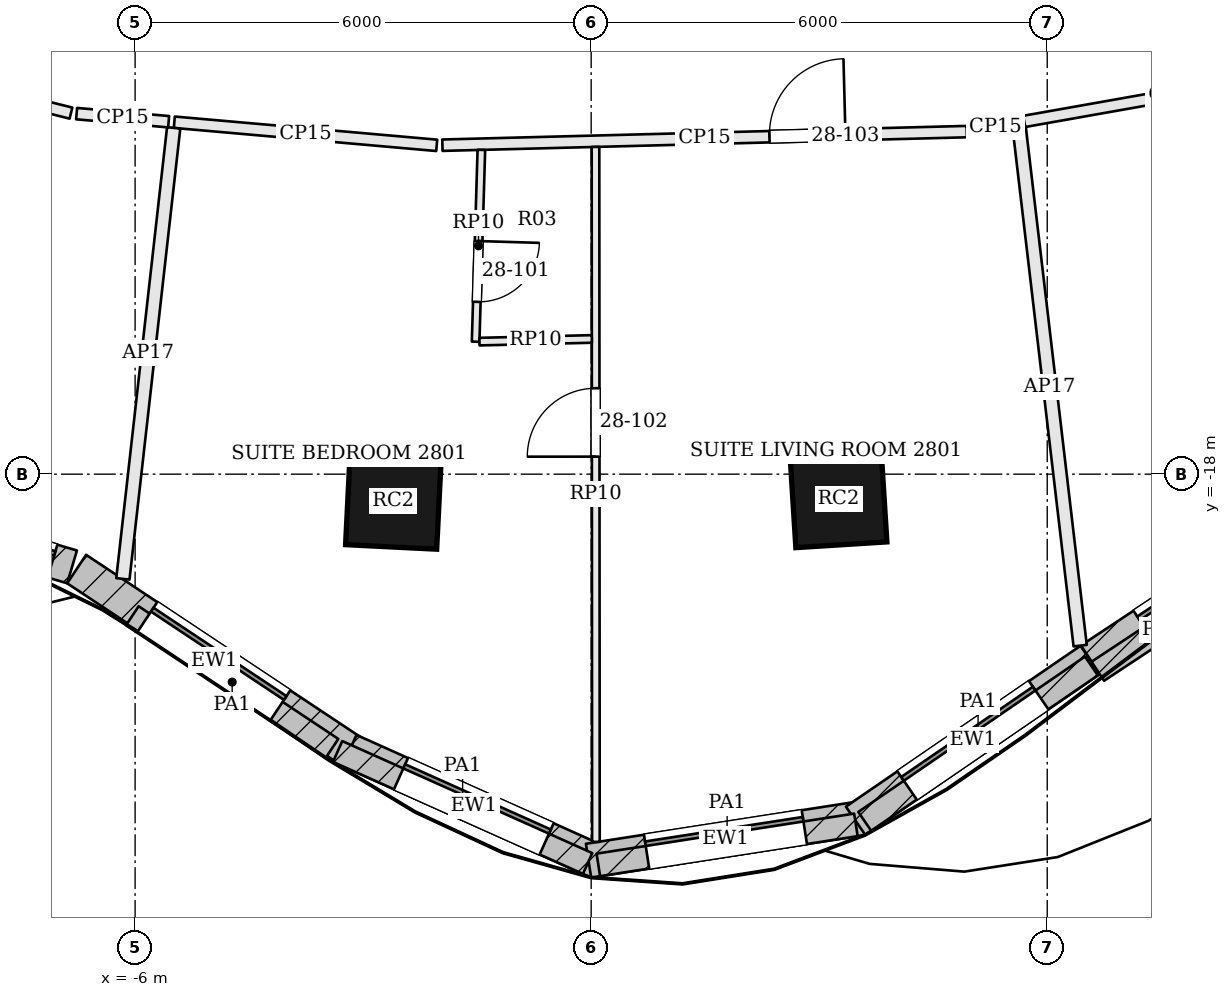
"""IFC4 building model, lengths in metres.
Left out: names, types, materials, properties, quantities, classifications, styles, units other than length and angle.
Written with IfcOpenShell. Run it as: python <this file> out.ifc"""

import sys

from ifc_helpers import new_model, si_unit, direction, frame, frame_2d, origin, origin_2d, place, context, subcontext, project, spatial, rectangle, extrude, element, fill, save


model = new_model("IFC4")
c1 = context("Model", 3, precision=1e-05, world=origin(), true_north=direction((0.0, 1.0)))
c2 = subcontext(c1, "Body", "Model", "MODEL_VIEW")
j1 = project(units=[si_unit("LENGTHUNIT", "METRE"), si_unit("PLANEANGLEUNIT", "RADIAN")], contexts=[c1])
p1 = place(None, origin())
s1 = spatial("IfcSite", under=j1, at=p1, CompositionType="ELEMENT")
p2 = place(p1, origin())
s2 = spatial("IfcBuilding", under=s1, at=p2, CompositionType="ELEMENT")
p3 = place(p2, frame((0.0, 0.0, 117.6)))
s3 = spatial("IfcBuildingStorey", under=s2, at=p3, CompositionType="ELEMENT", Elevation=117.6)
for number, where, z_axis, x_axis in (
    (1, (-2.602, -18.358, 0.0), (0.0, 0.0, 1.0), (0.999, -0.05, 0.0)),
    (2, (3.254, -18.33, 0.0), (0.0, 0.0, 1.0), (0.998, 0.063, 0.0)),
):
    element("IfcColumn", number, at=place(p3, frame(where, z_axis=z_axis, x_axis=x_axis)), inside=s3, PredefinedType="COLUMN", context=c2, shape_type="SweptSolid", body=[
        extrude(rectangle(XDim=1.2, YDim=1.2, at=origin_2d()), origin(), (0.0, 0.0, 1.0), 2.8),
    ])
p4 = place(p3, frame((-9.357, -18.469, 0.0), z_axis=(0.0, 0.0, 1.0), x_axis=(0.958524054629, -0.285011643091, 0.0)))
e3 = element("IfcWall", 3, at=p4, inside=s3, PredefinedType="SOLIDWALL", context=c2, shape_type="SweptSolid", body=[
    extrude(rectangle(XDim=2.637, YDim=0.45, at=frame_2d((1.319, 0.0))), origin(), (0.0, 0.0, 1.0), 3.3),
])
p5 = place(p4, frame((0.269, 0.0, 0.9)))
e4 = element("IfcOpeningElement", 4, at=p5, cuts=e3, PredefinedType="OPENING", context=c2, shape_type="SweptSolid", body=[
    extrude(rectangle(XDim=2.1, YDim=1.8, at=frame_2d((1.05, 0.9))), frame((0.0, 0.235, 0.0), z_axis=(0.0, -1.0, 0.0), x_axis=(1.0, 0.0, 0.0)), (0.0, 0.0, 1.0), 0.47),
])
p6 = place(p3, frame((-6.769, -19.248, 0.0), z_axis=(0.0, 0.0, 1.0), x_axis=(0.832973379274, -0.553313066375, 0.0)))
e5 = element("IfcWall", 5, at=p6, inside=s3, PredefinedType="SOLIDWALL", context=c2, shape_type="SweptSolid", body=[
    extrude(rectangle(XDim=4.348, YDim=0.45, at=frame_2d((2.174, 0.0))), origin(), (0.0, 0.0, 1.0), 3.3),
])
p7 = place(p6, frame((1.124, 0.0, 0.9)))
e6 = element("IfcOpeningElement", 6, at=p7, cuts=e5, PredefinedType="OPENING", context=c2, shape_type="SweptSolid", body=[
    extrude(rectangle(XDim=2.1, YDim=1.8, at=frame_2d((1.05, 0.9))), frame((0.0, 0.235, 0.0), z_axis=(0.0, -1.0, 0.0), x_axis=(1.0, 0.0, 0.0)), (0.0, 0.0, 1.0), 0.47),
])
p8 = place(p3, frame((-3.179, -21.636, 0.0), z_axis=(0.0, 0.0, 1.0), x_axis=(0.912608353595, -0.40883492139, 0.0)))
e7 = element("IfcWall", 7, at=p8, inside=s3, PredefinedType="SOLIDWALL", context=c2, shape_type="SweptSolid", body=[
    extrude(rectangle(XDim=3.585, YDim=0.45, at=frame_2d((1.792, 0.0))), origin(), (0.0, 0.0, 1.0), 3.3),
])
p9 = place(p8, frame((0.742, 0.0, 0.9)))
e8 = element("IfcOpeningElement", 8, at=p9, cuts=e7, PredefinedType="OPENING", context=c2, shape_type="SweptSolid", body=[
    extrude(rectangle(XDim=2.1, YDim=1.8, at=frame_2d((1.05, 0.9))), frame((0.0, 0.235, 0.0), z_axis=(0.0, -1.0, 0.0), x_axis=(1.0, 0.0, 0.0)), (0.0, 0.0, 1.0), 0.47),
])
p10 = place(p3, frame((-0.035, -23.085, 0.0), z_axis=(0.0, 0.0, 1.0), x_axis=(0.988133637562, 0.153596596054, 0.0)))
e9 = element("IfcWall", 9, at=p10, inside=s3, PredefinedType="SOLIDWALL", context=c2, shape_type="SweptSolid", body=[
    extrude(rectangle(XDim=3.646, YDim=0.45, at=frame_2d((1.823, 0.0))), origin(), (0.0, 0.0, 1.0), 3.3),
])
p11 = place(p10, frame((0.773, 0.0, 0.9)))
e10 = element("IfcOpeningElement", 10, at=p11, cuts=e9, PredefinedType="OPENING", context=c2, shape_type="SweptSolid", body=[
    extrude(rectangle(XDim=2.1, YDim=1.8, at=frame_2d((1.05, 0.9))), frame((0.0, 0.235, 0.0), z_axis=(0.0, -1.0, 0.0), x_axis=(1.0, 0.0, 0.0)), (0.0, 0.0, 1.0), 0.47),
])
p12 = place(p3, frame((3.479, -22.56, 0.0), z_axis=(0.0, 0.0, 1.0), x_axis=(0.824722766417, 0.565537230033, 0.0)))
e11 = element("IfcWall", 11, at=p12, inside=s3, PredefinedType="SOLIDWALL", context=c2, shape_type="SweptSolid", body=[
    extrude(rectangle(XDim=3.742, YDim=0.45, at=frame_2d((1.871, 0.0))), origin(), (0.0, 0.0, 1.0), 3.3),
])
p13 = place(p12, frame((0.821, 0.0, 0.9)))
e12 = element("IfcOpeningElement", 12, at=p13, cuts=e11, PredefinedType="OPENING", context=c2, shape_type="SweptSolid", body=[
    extrude(rectangle(XDim=2.1, YDim=1.8, at=frame_2d((1.05, 0.9))), frame((0.0, 0.235, 0.0), z_axis=(0.0, -1.0, 0.0), x_axis=(1.0, 0.0, 0.0)), (0.0, 0.0, 1.0), 0.47),
])
p14 = place(p3, frame((6.568, -20.441, 0.0), z_axis=(0.0, 0.0, 1.0), x_axis=(0.834034214531, 0.551712723246, 0.0)))
e13 = element("IfcWall", 13, at=p14, inside=s3, PredefinedType="SOLIDWALL", context=c2, shape_type="SweptSolid", body=[
    extrude(rectangle(XDim=3.757, YDim=0.45, at=frame_2d((1.879, 0.0))), origin(), (0.0, 0.0, 1.0), 3.3),
])
p15 = place(p14, frame((0.829, 0.0, 0.9)))
e14 = element("IfcOpeningElement", 14, at=p15, cuts=e13, PredefinedType="OPENING", context=c2, shape_type="SweptSolid", body=[
    extrude(rectangle(XDim=2.1, YDim=1.8, at=frame_2d((1.05, 0.9))), frame((0.0, 0.235, 0.0), z_axis=(0.0, -1.0, 0.0), x_axis=(1.0, 0.0, 0.0)), (0.0, 0.0, 1.0), 0.47),
])
p16 = place(p3, frame((-6.037, -19.863, 3.6), z_axis=(0.0, 0.0, 1.0), x_axis=(0.832989992548, -0.553288055459, 0.0)))
e15 = element("IfcWall", 15, at=p16, inside=s3, PredefinedType="PARAPET", context=c2, shape_type="SweptSolid", body=[
    extrude(rectangle(XDim=3.154, YDim=0.3, at=frame_2d((1.577, 0.0))), origin(), (0.0, 0.0, 1.0), 1.1),
])
p17 = place(p3, frame((-3.336, -21.648, 3.6), z_axis=(0.0, 0.0, 1.0), x_axis=(0.912617427268, -0.40881466638, 0.0)))
e16 = element("IfcWall", 16, at=p17, inside=s3, PredefinedType="PARAPET", context=c2, shape_type="SweptSolid", body=[
    extrude(rectangle(XDim=3.604, YDim=0.3, at=frame_2d((1.802, 0.0))), origin(), (0.0, 0.0, 1.0), 1.1),
])
p18 = place(p3, frame((0.094, -23.14, 3.6), z_axis=(0.0, 0.0, 1.0), x_axis=(0.988150084887, 0.153490748056, 0.0)))
e17 = element("IfcWall", 17, at=p18, inside=s3, PredefinedType="PARAPET", context=c2, shape_type="SweptSolid", body=[
    extrude(rectangle(XDim=3.429, YDim=0.3, at=frame_2d((1.715, 0.0))), origin(), (0.0, 0.0, 1.0), 1.1),
])
p19 = place(p3, frame((3.599, -22.568, 3.6), z_axis=(0.0, 0.0, 1.0), x_axis=(0.82476034254, 0.565482428881, 0.0)))
e18 = element("IfcWall", 18, at=p19, inside=s3, PredefinedType="PARAPET", context=c2, shape_type="SweptSolid", body=[
    extrude(rectangle(XDim=3.616, YDim=0.3, at=frame_2d((1.808, 0.0))), origin(), (0.0, 0.0, 1.0), 1.1),
])
p20 = place(p3, frame((6.665, -20.593, 3.6), z_axis=(0.0, 0.0, 1.0), x_axis=(0.834081514068, 0.551641213008, 0.0)))
e19 = element("IfcWall", 19, at=p20, inside=s3, PredefinedType="PARAPET", context=c2, shape_type="SweptSolid", body=[
    extrude(rectangle(XDim=1.991, YDim=0.3, at=frame_2d((0.996, 0.0))), origin(), (0.0, 0.0, 1.0), 1.1),
])
p21 = place(p3, frame((-5.484, -13.37, 0.0), z_axis=(0.0, 0.0, 1.0), x_axis=(0.996140545205, -0.087772513919, 0.0)))
e20 = element("IfcWall", 20, at=p21, inside=s3, PredefinedType="PARTITIONING", context=c2, shape_type="SweptSolid", body=[
    extrude(rectangle(XDim=3.466, YDim=0.15, at=frame_2d((1.733, 0.0))), origin(), (0.0, 0.0, 1.0), 2.684),
])
p22 = place(p3, frame((-1.957, -13.672, 0.0), z_axis=(0.0, 0.0, 1.0), x_axis=(0.99966456087, 0.025899145557, 0.0)))
e21 = element("IfcWall", 21, at=p22, inside=s3, PredefinedType="PARTITIONING", context=c2, shape_type="SweptSolid", body=[
    extrude(rectangle(XDim=6.9, YDim=0.15, at=frame_2d((3.45, 0.0))), origin(), (0.0, 0.0, 1.0), 2.684),
])
p23 = place(p22, frame((4.304, 0.0, 0.0)))
e22 = element("IfcOpeningElement", 22, at=p23, cuts=e21, PredefinedType="OPENING", context=c2, shape_type="SweptSolid", body=[
    extrude(rectangle(XDim=1.0, YDim=2.1, at=frame_2d((0.5, 1.05))), frame((0.0, 0.085, 0.0), z_axis=(0.0, -1.0, 0.0), x_axis=(1.0, 0.0, 0.0)), (0.0, 0.0, 1.0), 0.17),
])
p24 = place(p3, frame((5.015, -13.48, 0.0), z_axis=(0.0, 0.0, 1.0), x_axis=(0.984644078065, 0.174573879866, 0.0)))
e23 = element("IfcWall", 23, at=p24, inside=s3, PredefinedType="PARTITIONING", context=c2, shape_type="SweptSolid", body=[
    extrude(rectangle(XDim=0.618, YDim=0.15, at=frame_2d((0.309, 0.0))), origin(), (0.0, 0.0, 1.0), 2.684),
])
p25 = place(p3, frame((-6.161, -19.377, 0.0), z_axis=(0.0, 0.0, 1.0), x_axis=(0.111916919639, 0.993717567067, 0.0)))
e24 = element("IfcWall", 24, at=p25, inside=s3, PredefinedType="PARTITIONING", context=c2, shape_type="SweptSolid", body=[
    extrude(rectangle(XDim=5.971, YDim=0.175, at=frame_2d((2.985, 0.0))), origin(), (0.0, 0.0, 1.0), 2.684),
])
p26 = place(p3, frame((6.433, -20.256, 0.0), z_axis=(0.0, 0.0, 1.0), x_axis=(-0.116866039573, 0.993147687303, 0.0)))
e25 = element("IfcWall", 25, at=p26, inside=s3, PredefinedType="PARTITIONING", context=c2, shape_type="SweptSolid", body=[
    extrude(rectangle(XDim=6.856, YDim=0.175, at=frame_2d((3.428, 0.0))), origin(), (0.0, 0.0, 1.0), 2.684),
])
p27 = place(p3, frame((5.697, -13.359, 0.0), z_axis=(0.0, 0.0, 1.0), x_axis=(0.984641449362, 0.174588705818, 0.0)))
e26 = element("IfcWall", 26, at=p27, inside=s3, PredefinedType="PARTITIONING", context=c2, shape_type="SweptSolid", body=[
    extrude(rectangle(XDim=4.022, YDim=0.15, at=frame_2d((2.011, 0.0))), origin(), (0.0, 0.0, 1.0), 2.684),
])
p28 = place(p3, frame((-11.387, -12.111, 0.0), z_axis=(0.0, 0.0, 1.0), x_axis=(0.96999205549, -0.243136612393, 0.0)))
e27 = element("IfcWall", 27, at=p28, inside=s3, PredefinedType="PARTITIONING", context=c2, shape_type="SweptSolid", body=[
    extrude(rectangle(XDim=4.683, YDim=0.15, at=frame_2d((2.342, 0.0))), origin(), (0.0, 0.0, 1.0), 2.684),
])
p29 = place(p28, frame((2.371, 0.0, 0.0)))
e28 = element("IfcOpeningElement", 28, at=p29, cuts=e27, PredefinedType="OPENING", context=c2, shape_type="SweptSolid", body=[
    extrude(rectangle(XDim=1.0, YDim=2.1, at=frame_2d((0.5, 1.05))), frame((0.0, 0.085, 0.0), z_axis=(0.0, -1.0, 0.0), x_axis=(1.0, 0.0, 0.0)), (0.0, 0.0, 1.0), 0.17),
])
p30 = place(p3, frame((-6.77, -13.257, 0.0), z_axis=(0.0, 0.0, 1.0), x_axis=(0.996138123663, -0.08779999194, 0.0)))
e29 = element("IfcWall", 29, at=p30, inside=s3, PredefinedType="PARTITIONING", context=c2, shape_type="SweptSolid", body=[
    extrude(rectangle(XDim=1.215, YDim=0.15, at=frame_2d((0.607, 0.0))), origin(), (0.0, 0.0, 1.0), 2.684),
])
p31 = place(p3, frame((0.062, -22.837, 0.0), z_axis=(0.0, 0.0, 1.0), x_axis=(-0.000614184887, 0.999999811388, 0.0)))
e30 = element("IfcWall", 30, at=p31, inside=s3, PredefinedType="PARTITIONING", context=c2, shape_type="SweptSolid", body=[
    extrude(rectangle(XDim=9.143, YDim=0.1, at=frame_2d((4.571, 0.0))), origin(), (0.0, 0.0, 1.0), 2.684),
])
p32 = place(p31, frame((5.068, 0.0, 0.0)))
e31 = element("IfcOpeningElement", 31, at=p32, cuts=e30, PredefinedType="OPENING", context=c2, shape_type="SweptSolid", body=[
    extrude(rectangle(XDim=0.9, YDim=2.4, at=frame_2d((0.45, 1.2))), frame((0.0, 0.06, 0.0), z_axis=(0.0, -1.0, 0.0), x_axis=(1.0, 0.0, 0.0)), (0.0, 0.0, 1.0), 0.12),
])
p33 = place(p3, frame((-1.445, -13.734, 0.0), z_axis=(0.0, 0.0, 1.0), x_axis=(-0.029879272139, -0.999553514874, 0.0)))
e32 = element("IfcWall", 32, at=p33, inside=s3, PredefinedType="PARTITIONING", context=c2, shape_type="SweptSolid", body=[
    extrude(rectangle(XDim=2.525, YDim=0.1, at=frame_2d((1.262, 0.0))), origin(), (0.0, 0.0, 1.0), 2.684),
])
p34 = place(p33, frame((1.2, 0.0, 0.0)))
e33 = element("IfcOpeningElement", 33, at=p34, cuts=e32, PredefinedType="OPENING", context=c2, shape_type="SweptSolid", body=[
    extrude(rectangle(XDim=0.8, YDim=2.1, at=frame_2d((0.4, 1.05))), frame((0.0, 0.06, 0.0), z_axis=(0.0, -1.0, 0.0), x_axis=(1.0, 0.0, 0.0)), (0.0, 0.0, 1.0), 0.12),
])
p35 = place(p3, frame((-1.47, -16.256, 0.0), z_axis=(0.0, 0.0, 1.0), x_axis=(0.999717514742, 0.023767429771, 0.0)))
e34 = element("IfcWall", 34, at=p35, inside=s3, PredefinedType="PARTITIONING", context=c2, shape_type="SweptSolid", body=[
    extrude(rectangle(XDim=1.479, YDim=0.1, at=frame_2d((0.74, 0.0))), origin(), (0.0, 0.0, 1.0), 2.684),
])
p36 = place(p5, origin())
e35 = element("IfcWindow", 35, at=p36, inside=s3, PartitioningType="SINGLE_PANEL", PredefinedType="WINDOW", context=c2, shape_type="SweptSolid", body=[
    extrude(rectangle(XDim=2.1, YDim=1.8, at=frame_2d((1.05, 0.9))), frame((0.0, 0.135, 0.0), z_axis=(0.0, -1.0, 0.0), x_axis=(1.0, 0.0, 0.0)), (0.0, 0.0, 1.0), 0.06),
])
fill(e4, e35)
p37 = place(p7, origin())
e36 = element("IfcWindow", 36, at=p37, inside=s3, PartitioningType="SINGLE_PANEL", PredefinedType="WINDOW", context=c2, shape_type="SweptSolid", body=[
    extrude(rectangle(XDim=2.1, YDim=1.8, at=frame_2d((1.05, 0.9))), frame((0.0, 0.135, 0.0), z_axis=(0.0, -1.0, 0.0), x_axis=(1.0, 0.0, 0.0)), (0.0, 0.0, 1.0), 0.06),
])
fill(e6, e36)
p38 = place(p9, origin())
e37 = element("IfcWindow", 37, at=p38, inside=s3, PartitioningType="SINGLE_PANEL", PredefinedType="WINDOW", context=c2, shape_type="SweptSolid", body=[
    extrude(rectangle(XDim=2.1, YDim=1.8, at=frame_2d((1.05, 0.9))), frame((0.0, 0.135, 0.0), z_axis=(0.0, -1.0, 0.0), x_axis=(1.0, 0.0, 0.0)), (0.0, 0.0, 1.0), 0.06),
])
fill(e8, e37)
p39 = place(p11, origin())
e38 = element("IfcWindow", 38, at=p39, inside=s3, PartitioningType="SINGLE_PANEL", PredefinedType="WINDOW", context=c2, shape_type="SweptSolid", body=[
    extrude(rectangle(XDim=2.1, YDim=1.8, at=frame_2d((1.05, 0.9))), frame((0.0, 0.135, 0.0), z_axis=(0.0, -1.0, 0.0), x_axis=(1.0, 0.0, 0.0)), (0.0, 0.0, 1.0), 0.06),
])
fill(e10, e38)
p40 = place(p13, origin())
e39 = element("IfcWindow", 39, at=p40, inside=s3, PartitioningType="SINGLE_PANEL", PredefinedType="WINDOW", context=c2, shape_type="SweptSolid", body=[
    extrude(rectangle(XDim=2.1, YDim=1.8, at=frame_2d((1.05, 0.9))), frame((0.0, 0.135, 0.0), z_axis=(0.0, -1.0, 0.0), x_axis=(1.0, 0.0, 0.0)), (0.0, 0.0, 1.0), 0.06),
])
fill(e12, e39)
p41 = place(p15, origin())
e40 = element("IfcWindow", 40, at=p41, inside=s3, PartitioningType="SINGLE_PANEL", PredefinedType="WINDOW", context=c2, shape_type="SweptSolid", body=[
    extrude(rectangle(XDim=2.1, YDim=1.8, at=frame_2d((1.05, 0.9))), frame((0.0, 0.135, 0.0), z_axis=(0.0, -1.0, 0.0), x_axis=(1.0, 0.0, 0.0)), (0.0, 0.0, 1.0), 0.06),
])
fill(e14, e40)
p42 = place(p34, origin())
e41 = element("IfcDoor", 41, at=p42, inside=s3, OperationType="SINGLE_SWING_LEFT", PredefinedType="DOOR", context=c2, shape_type="SweptSolid", body=[
    extrude(rectangle(XDim=0.8, YDim=2.1, at=frame_2d((0.4, 1.05))), frame((0.0, 0.025, 0.0), z_axis=(0.0, -1.0, 0.0), x_axis=(1.0, 0.0, 0.0)), (0.0, 0.0, 1.0), 0.05),
])
fill(e33, e41)
p43 = place(p32, origin())
e42 = element("IfcDoor", 42, at=p43, inside=s3, OperationType="SINGLE_SWING_LEFT", PredefinedType="DOOR", context=c2, shape_type="SweptSolid", body=[
    extrude(rectangle(XDim=0.9, YDim=2.4, at=frame_2d((0.45, 1.2))), frame((0.0, 0.025, 0.0), z_axis=(0.0, -1.0, 0.0), x_axis=(1.0, 0.0, 0.0)), (0.0, 0.0, 1.0), 0.05),
])
fill(e31, e42)
p44 = place(p23, origin())
e43 = element("IfcDoor", 43, at=p44, inside=s3, OperationType="SINGLE_SWING_RIGHT", PredefinedType="DOOR", context=c2, shape_type="SweptSolid", body=[
    extrude(rectangle(XDim=1.0, YDim=2.1, at=frame_2d((0.5, 1.05))), frame((0.0, 0.025, 0.0), z_axis=(0.0, -1.0, 0.0), x_axis=(1.0, 0.0, 0.0)), (0.0, 0.0, 1.0), 0.05),
])
fill(e22, e43)
save(model, sys.argv[1])
